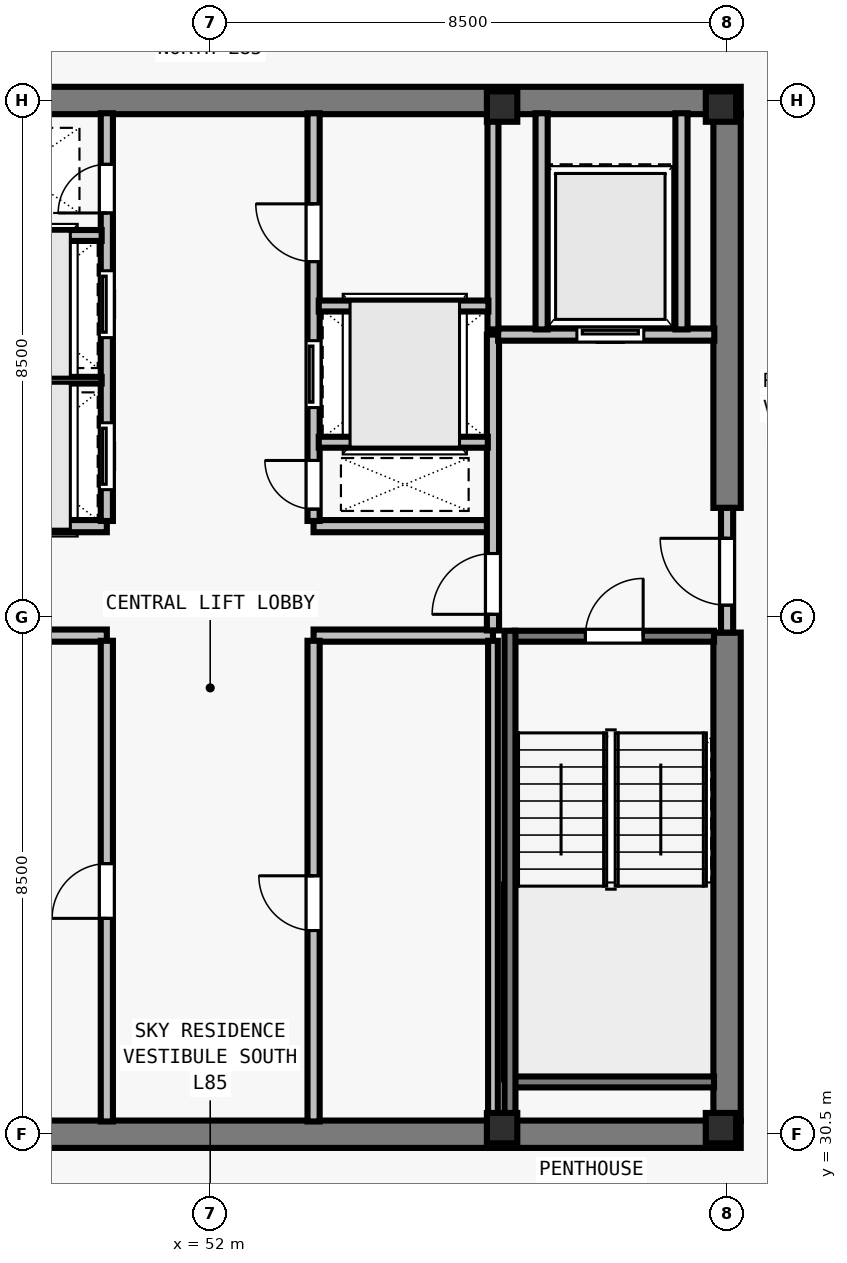
"""IFC4 building model, lengths in metres.
Left out: names, types, materials, properties, quantities, classifications, styles, units other than length and angle.
Written with IfcOpenShell. Run it as: python <this file> out.ifc"""

import sys

from ifc_helpers import new_model, si_unit, direction, frame, frame_2d, origin, origin_2d, place, context, subcontext, project, spatial, rectangle, i_section, extrude, element, fill, save


model = new_model("IFC4")
c1 = context("Model", 3, precision=1e-05, world=origin(), true_north=direction((0.0, 1.0)))
c2 = subcontext(c1, "Body", "Model", "MODEL_VIEW")
j1 = project(units=[si_unit("LENGTHUNIT", "METRE"), si_unit("PLANEANGLEUNIT", "RADIAN")], contexts=[c1])
p1 = place(None, origin())
s1 = spatial("IfcSite", under=j1, at=p1, CompositionType="ELEMENT")
p2 = place(p1, origin())
s2 = spatial("IfcBuilding", under=s1, at=p2, CompositionType="ELEMENT")
p3 = place(p2, frame((0.0, 0.0, 308.5)))
s3 = spatial("IfcBuildingStorey", under=s2, at=p3, CompositionType="ELEMENT", Elevation=308.5)
for number, where, z_axis, x_axis in (
    (1, (56.8, 30.6, 0.0), (0.0, 0.0, 1.0), (1.0, 0.0, 0.0)),
    (2, (60.4, 30.6, 0.0), (0.0, 0.0, 1.0), (1.0, 0.0, 0.0)),
    (3, (56.8, 47.4, 0.0), (0.0, 0.0, 1.0), (1.0, 0.0, 0.0)),
    (4, (60.4, 47.4, 0.0), (0.0, 0.0, 1.0), (1.0, 0.0, 0.0)),
):
    element("IfcColumn", number, at=place(p3, frame(where, z_axis=z_axis, x_axis=x_axis)), inside=s3, PredefinedType="COLUMN", context=c2, shape_type="SweptSolid", body=[
        extrude(i_section(OverallWidth=0.5, OverallDepth=0.5, WebThickness=0.028, FlangeThickness=0.045, at=origin_2d()), origin(), (0.0, 0.0, 1.0), 3.5),
    ])
for number, where, z_axis, x_axis in (
    (5, (43.275, 30.5, 0.0), (0.0, 0.0, 1.0), (1.0, 0.0, 0.0)),
    (6, (43.275, 47.5, 0.0), (0.0, 0.0, 1.0), (1.0, 0.0, 0.0)),
):
    element("IfcWall", number, at=place(p3, frame(where, z_axis=z_axis, x_axis=x_axis)), inside=s3, PredefinedType="SHEAR", context=c2, shape_type="SweptSolid", body=[
        extrude(rectangle(XDim=17.45, YDim=0.45, at=frame_2d((8.725, 0.0))), origin(), (0.0, 0.0, 1.0), 3.29),
    ])
p4 = place(p3, frame((60.5, 30.715, 0.0), z_axis=(0.0, 0.0, 1.0), x_axis=(0.0, 1.0, 0.0)))
e7 = element("IfcWall", 7, at=p4, inside=s3, PredefinedType="SHEAR", context=c2, shape_type="SweptSolid", body=[
    extrude(rectangle(XDim=8.035, YDim=0.45, at=frame_2d((4.018, 0.0))), origin(), (0.0, 0.0, 1.0), 3.29),
])
p5 = place(p3, frame((60.5, 40.8, 0.0), z_axis=(0.0, 0.0, 1.0), x_axis=(0.0, 1.0, 0.0)))
e8 = element("IfcWall", 8, at=p5, inside=s3, PredefinedType="SHEAR", context=c2, shape_type="SweptSolid", body=[
    extrude(rectangle(XDim=6.485, YDim=0.45, at=frame_2d((3.242, 0.0))), origin(), (0.0, 0.0, 1.0), 3.29),
])
for number, where, z_axis, x_axis in (
    (9, (47.35, 38.7, 0.0), (0.0, 0.0, 1.0), (1.0, 0.0, 0.0)),
    (10, (47.35, 40.5, 0.0), (0.0, 0.0, 1.0), (1.0, 0.0, 0.0)),
    (11, (53.7, 38.7, 0.0), (0.0, 0.0, 1.0), (1.0, 0.0, 0.0)),
    (12, (53.7, 40.5, 0.0), (0.0, 0.0, 1.0), (1.0, 0.0, 0.0)),
):
    element("IfcWall", number, at=place(p3, frame(where, z_axis=z_axis, x_axis=x_axis)), inside=s3, PredefinedType="SOLIDWALL", context=c2, shape_type="SweptSolid", body=[
        extrude(rectangle(XDim=2.95, YDim=0.2, at=frame_2d((1.475, 0.0))), origin(), (0.0, 0.0, 1.0), 3.29),
    ])
p6 = place(p3, frame((50.3, 30.71, 0.0), z_axis=(0.0, 0.0, 1.0), x_axis=(0.0, 1.0, 0.0)))
e13 = element("IfcWall", 13, at=p6, inside=s3, PredefinedType="SOLIDWALL", context=c2, shape_type="SweptSolid", body=[
    extrude(rectangle(XDim=7.905, YDim=0.2, at=frame_2d((3.953, 0.0))), origin(), (0.0, 0.0, 1.0), 3.29),
])
p7 = place(p6, frame((3.34, 0.0, 0.0)))
e14 = element("IfcOpeningElement", 14, at=p7, cuts=e13, PredefinedType="OPENING", context=c2, shape_type="SweptSolid", body=[
    extrude(rectangle(XDim=0.9, YDim=2.12, at=frame_2d((0.45, 1.06))), frame((0.0, 0.11, 0.0), z_axis=(0.0, -1.0, 0.0), x_axis=(1.0, 0.0, 0.0)), (0.0, 0.0, 1.0), 0.22),
])
p8 = place(p3, frame((53.7, 30.71, 0.0), z_axis=(0.0, 0.0, 1.0), x_axis=(0.0, 1.0, 0.0)))
e15 = element("IfcWall", 15, at=p8, inside=s3, PredefinedType="SOLIDWALL", context=c2, shape_type="SweptSolid", body=[
    extrude(rectangle(XDim=7.905, YDim=0.2, at=frame_2d((3.953, 0.0))), origin(), (0.0, 0.0, 1.0), 3.29),
])
p9 = place(p8, frame((3.14, 0.0, 0.0)))
e16 = element("IfcOpeningElement", 16, at=p9, cuts=e15, PredefinedType="OPENING", context=c2, shape_type="SweptSolid", body=[
    extrude(rectangle(XDim=0.9, YDim=2.12, at=frame_2d((0.45, 1.06))), frame((0.0, 0.11, 0.0), z_axis=(0.0, -1.0, 0.0), x_axis=(1.0, 0.0, 0.0)), (0.0, 0.0, 1.0), 0.22),
])
p10 = place(p3, frame((50.3, 40.585, 0.0), z_axis=(0.0, 0.0, 1.0), x_axis=(0.0, 1.0, 0.0)))
e17 = element("IfcWall", 17, at=p10, inside=s3, PredefinedType="SOLIDWALL", context=c2, shape_type="SweptSolid", body=[
    extrude(rectangle(XDim=6.705, YDim=0.2, at=frame_2d((3.353, 0.0))), origin(), (0.0, 0.0, 1.0), 3.29),
])
p11 = place(p10, frame((0.515, 0.0, 0.0)))
e18 = element("IfcOpeningElement", 18, at=p11, cuts=e17, PredefinedType="OPENING", context=c2, shape_type="SweptSolid", body=[
    extrude(rectangle(XDim=1.1, YDim=2.2, at=frame_2d((0.55, 1.1))), frame((0.0, 0.11, 0.0), z_axis=(0.0, -1.0, 0.0), x_axis=(1.0, 0.0, 0.0)), (0.0, 0.0, 1.0), 0.22),
])
p12 = place(p10, frame((3.015, 0.0, 0.0)))
e19 = element("IfcOpeningElement", 19, at=p12, cuts=e17, PredefinedType="OPENING", context=c2, shape_type="SweptSolid", body=[
    extrude(rectangle(XDim=1.1, YDim=2.2, at=frame_2d((0.55, 1.1))), frame((0.0, 0.11, 0.0), z_axis=(0.0, -1.0, 0.0), x_axis=(1.0, 0.0, 0.0)), (0.0, 0.0, 1.0), 0.22),
])
p13 = place(p10, frame((5.065, 0.0, 0.0)))
e20 = element("IfcOpeningElement", 20, at=p13, cuts=e17, PredefinedType="OPENING", context=c2, shape_type="SweptSolid", body=[
    extrude(rectangle(XDim=0.8, YDim=2.08, at=frame_2d((0.4, 1.04))), frame((0.0, 0.11, 0.0), z_axis=(0.0, -1.0, 0.0), x_axis=(1.0, 0.0, 0.0)), (0.0, 0.0, 1.0), 0.22),
])
p14 = place(p3, frame((53.7, 40.585, 0.0), z_axis=(0.0, 0.0, 1.0), x_axis=(0.0, 1.0, 0.0)))
e21 = element("IfcWall", 21, at=p14, inside=s3, PredefinedType="SOLIDWALL", context=c2, shape_type="SweptSolid", body=[
    extrude(rectangle(XDim=6.705, YDim=0.2, at=frame_2d((3.353, 0.0))), origin(), (0.0, 0.0, 1.0), 3.29),
])
p15 = place(p14, frame((0.195, 0.0, 0.0)))
e22 = element("IfcOpeningElement", 22, at=p15, cuts=e21, PredefinedType="OPENING", context=c2, shape_type="SweptSolid", body=[
    extrude(rectangle(XDim=0.8, YDim=2.08, at=frame_2d((0.4, 1.04))), frame((0.0, 0.11, 0.0), z_axis=(0.0, -1.0, 0.0), x_axis=(1.0, 0.0, 0.0)), (0.0, 0.0, 1.0), 0.22),
])
p16 = place(p14, frame((1.865, 0.0, 0.0)))
e23 = element("IfcOpeningElement", 23, at=p16, cuts=e21, PredefinedType="OPENING", context=c2, shape_type="SweptSolid", body=[
    extrude(rectangle(XDim=1.1, YDim=2.2, at=frame_2d((0.55, 1.1))), frame((0.0, 0.11, 0.0), z_axis=(0.0, -1.0, 0.0), x_axis=(1.0, 0.0, 0.0)), (0.0, 0.0, 1.0), 0.22),
])
p17 = place(p14, frame((4.265, 0.0, 0.0)))
e24 = element("IfcOpeningElement", 24, at=p17, cuts=e21, PredefinedType="OPENING", context=c2, shape_type="SweptSolid", body=[
    extrude(rectangle(XDim=0.95, YDim=2.12, at=frame_2d((0.475, 1.06))), frame((0.0, 0.11, 0.0), z_axis=(0.0, -1.0, 0.0), x_axis=(1.0, 0.0, 0.0)), (0.0, 0.0, 1.0), 0.22),
])
p18 = place(p3, frame((60.5, 38.75, 0.0), z_axis=(0.0, 0.0, 1.0), x_axis=(0.0, 1.0, 0.0)))
e25 = element("IfcWall", 25, at=p18, inside=s3, PredefinedType="SOLIDWALL", context=c2, shape_type="SweptSolid", body=[
    extrude(rectangle(XDim=2.05, YDim=0.2, at=frame_2d((1.025, 0.0))), origin(), (0.0, 0.0, 1.0), 3.29),
])
p19 = place(p18, frame((0.45, 0.0, 0.0)))
e26 = element("IfcOpeningElement", 26, at=p19, cuts=e25, PredefinedType="OPENING", context=c2, shape_type="SweptSolid", body=[
    extrude(rectangle(XDim=1.1, YDim=2.15, at=frame_2d((0.55, 1.075))), frame((0.0, 0.11, 0.0), z_axis=(0.0, -1.0, 0.0), x_axis=(1.0, 0.0, 0.0)), (0.0, 0.0, 1.0), 0.22),
])
p20 = place(p3, frame((56.65, 38.785, 0.0), z_axis=(0.0, 0.0, 1.0), x_axis=(0.0, 1.0, 0.0)))
e27 = element("IfcWall", 27, at=p20, inside=s3, PredefinedType="SOLIDWALL", context=c2, shape_type="SweptSolid", body=[
    extrude(rectangle(XDim=4.865, YDim=0.2, at=frame_2d((2.433, 0.0))), origin(), (0.0, 0.0, 1.0), 3.29),
])
p21 = place(p20, frame((0.265, 0.0, 0.0)))
e28 = element("IfcOpeningElement", 28, at=p21, cuts=e27, PredefinedType="OPENING", context=c2, shape_type="SweptSolid", body=[
    extrude(rectangle(XDim=1.0, YDim=2.15, at=frame_2d((0.5, 1.075))), frame((0.0, 0.11, 0.0), z_axis=(0.0, -1.0, 0.0), x_axis=(1.0, 0.0, 0.0)), (0.0, 0.0, 1.0), 0.22),
])
p22 = place(p3, frame((56.735, 43.65, 0.0), z_axis=(0.0, 0.0, 1.0), x_axis=(1.0, 0.0, 0.0)))
e29 = element("IfcWall", 29, at=p22, inside=s3, PredefinedType="SOLIDWALL", context=c2, shape_type="SweptSolid", body=[
    extrude(rectangle(XDim=3.555, YDim=0.2, at=frame_2d((1.777, 0.0))), origin(), (0.0, 0.0, 1.0), 3.29),
])
p23 = place(p22, frame((1.295, 0.0, 0.0)))
e30 = element("IfcOpeningElement", 30, at=p23, cuts=e29, PredefinedType="OPENING", context=c2, shape_type="SweptSolid", body=[
    extrude(rectangle(XDim=1.1, YDim=2.2, at=frame_2d((0.55, 1.1))), frame((0.0, 0.11, 0.0), z_axis=(0.0, -1.0, 0.0), x_axis=(1.0, 0.0, 0.0)), (0.0, 0.0, 1.0), 0.22),
])
for number, where, z_axis, x_axis in (
    (31, (57.45, 43.735, 0.0), (0.0, 0.0, 1.0), (0.0, 1.0, 0.0)),
    (32, (59.75, 43.735, 0.0), (0.0, 0.0, 1.0), (0.0, 1.0, 0.0)),
):
    element("IfcWall", number, at=place(p3, frame(where, z_axis=z_axis, x_axis=x_axis)), inside=s3, PredefinedType="SOLIDWALL", context=c2, shape_type="SweptSolid", body=[
        extrude(rectangle(XDim=3.555, YDim=0.2, at=frame_2d((1.777, 0.0))), origin(), (0.0, 0.0, 1.0), 3.29),
    ])
p24 = place(p3, frame((56.65, 30.71, 0.0), z_axis=(0.0, 0.0, 1.0), x_axis=(0.0, 1.0, 0.0)))
e33 = element("IfcWall", 33, at=p24, inside=s3, PredefinedType="PARTITIONING", context=c2, shape_type="SweptSolid", body=[
    extrude(rectangle(XDim=7.905, YDim=0.16, at=frame_2d((3.953, 0.0))), origin(), (0.0, 0.0, 1.0), 3.29),
])
p25 = place(p3, frame((47.435, 42.9, 0.0), z_axis=(0.0, 0.0, 1.0), x_axis=(1.0, 0.0, 0.0)))
e34 = element("IfcWall", 34, at=p25, inside=s3, PredefinedType="PARTITIONING", context=c2, shape_type="SweptSolid", body=[
    extrude(rectangle(XDim=2.78, YDim=0.11, at=frame_2d((1.39, 0.0))), origin(), (0.0, 0.0, 1.0), 3.29),
])
p26 = place(p3, frame((47.425, 45.28, 0.0), z_axis=(0.0, 0.0, 1.0), x_axis=(1.0, 0.0, 0.0)))
e35 = element("IfcWall", 35, at=p26, inside=s3, PredefinedType="SOLIDWALL", context=c2, shape_type="SweptSolid", body=[
    extrude(rectangle(XDim=2.79, YDim=0.18, at=frame_2d((1.395, 0.0))), origin(), (0.0, 0.0, 1.0), 3.29),
])
p27 = place(p3, frame((56.65, 43.735, 0.0), z_axis=(0.0, 0.0, 1.0), x_axis=(0.0, 1.0, 0.0)))
e36 = element("IfcWall", 36, at=p27, inside=s3, PredefinedType="SOLIDWALL", context=c2, shape_type="SweptSolid", body=[
    extrude(rectangle(XDim=3.555, YDim=0.18, at=frame_2d((1.777, 0.0))), origin(), (0.0, 0.0, 1.0), 3.29),
])
p28 = place(p3, frame((53.785, 41.88, 0.0), z_axis=(0.0, 0.0, 1.0), x_axis=(1.0, 0.0, 0.0)))
e37 = element("IfcWall", 37, at=p28, inside=s3, PredefinedType="SOLIDWALL", context=c2, shape_type="SweptSolid", body=[
    extrude(rectangle(XDim=2.78, YDim=0.18, at=frame_2d((1.39, 0.0))), origin(), (0.0, 0.0, 1.0), 3.29),
])
p29 = place(p3, frame((53.785, 44.12, 0.0), z_axis=(0.0, 0.0, 1.0), x_axis=(1.0, 0.0, 0.0)))
e38 = element("IfcWall", 38, at=p29, inside=s3, PredefinedType="SOLIDWALL", context=c2, shape_type="SweptSolid", body=[
    extrude(rectangle(XDim=2.79, YDim=0.18, at=frame_2d((1.395, 0.0))), origin(), (0.0, 0.0, 1.0), 3.29),
])
p30 = place(p3, frame((57.005, 38.69, 0.0), z_axis=(0.0, 0.0, 1.0), x_axis=(1.0, 0.0, 0.0)))
e39 = element("IfcWall", 39, at=p30, inside=s3, PredefinedType="SOLIDWALL", context=c2, shape_type="SweptSolid", body=[
    extrude(rectangle(XDim=3.28, YDim=0.18, at=frame_2d((1.64, 0.0))), origin(), (0.0, 0.0, 1.0), 3.29),
])
p31 = place(p30, frame((1.165, 0.0, 0.0)))
e40 = element("IfcOpeningElement", 40, at=p31, cuts=e39, PredefinedType="OPENING", context=c2, shape_type="SweptSolid", body=[
    extrude(rectangle(XDim=0.95, YDim=2.15, at=frame_2d((0.475, 1.075))), frame((0.0, 0.1, 0.0), z_axis=(0.0, -1.0, 0.0), x_axis=(1.0, 0.0, 0.0)), (0.0, 0.0, 1.0), 0.2),
])
p32 = place(p3, frame((57.005, 31.36, 0.0), z_axis=(0.0, 0.0, 1.0), x_axis=(1.0, 0.0, 0.0)))
e41 = element("IfcWall", 41, at=p32, inside=s3, PredefinedType="SOLIDWALL", context=c2, shape_type="SweptSolid", body=[
    extrude(rectangle(XDim=3.28, YDim=0.18, at=frame_2d((1.64, 0.0))), origin(), (0.0, 0.0, 1.0), 3.29),
])
p33 = place(p3, frame((56.93, 38.78, 0.0), z_axis=(0.0, 0.0, 1.0), x_axis=(0.0, -1.0, 0.0)))
e42 = element("IfcWall", 42, at=p33, inside=s3, PredefinedType="SOLIDWALL", context=c2, shape_type="SweptSolid", body=[
    extrude(rectangle(XDim=8.067, YDim=0.18, at=frame_2d((4.034, 0.0))), origin(), (0.0, 0.0, 1.0), 3.29),
])
p34 = place(p19, origin())
e43 = element("IfcDoor", 43, at=p34, inside=s3, OperationType="SINGLE_SWING_RIGHT", PredefinedType="DOOR", context=c2, shape_type="SweptSolid", body=[
    extrude(rectangle(XDim=1.1, YDim=2.15, at=frame_2d((0.55, 1.075))), frame((0.0, 0.025, 0.0), z_axis=(0.0, -1.0, 0.0), x_axis=(1.0, 0.0, 0.0)), (0.0, 0.0, 1.0), 0.05),
])
fill(e26, e43)
p35 = place(p21, origin())
e44 = element("IfcDoor", 44, at=p35, inside=s3, OperationType="SINGLE_SWING_LEFT", PredefinedType="DOOR", context=c2, shape_type="SweptSolid", body=[
    extrude(rectangle(XDim=1.0, YDim=2.15, at=frame_2d((0.5, 1.075))), frame((0.0, 0.025, 0.0), z_axis=(0.0, -1.0, 0.0), x_axis=(1.0, 0.0, 0.0)), (0.0, 0.0, 1.0), 0.05),
])
fill(e28, e44)
p36 = place(p23, origin())
e45 = element("IfcDoor", 45, at=p36, inside=s3, OperationType="SLIDING_TO_LEFT", PredefinedType="DOOR", context=c2, shape_type="SweptSolid", body=[
    extrude(rectangle(XDim=1.1, YDim=2.2, at=frame_2d((0.55, 1.1))), frame((0.0, 0.025, 0.0), z_axis=(0.0, -1.0, 0.0), x_axis=(1.0, 0.0, 0.0)), (0.0, 0.0, 1.0), 0.05),
])
fill(e30, e45)
p37 = place(p7, origin())
e46 = element("IfcDoor", 46, at=p37, inside=s3, OperationType="SINGLE_SWING_LEFT", PredefinedType="DOOR", context=c2, shape_type="SweptSolid", body=[
    extrude(rectangle(XDim=0.9, YDim=2.12, at=frame_2d((0.45, 1.06))), frame((0.0, 0.025, 0.0), z_axis=(0.0, -1.0, 0.0), x_axis=(1.0, 0.0, 0.0)), (0.0, 0.0, 1.0), 0.05),
])
fill(e14, e46)
p38 = place(p9, origin())
e47 = element("IfcDoor", 47, at=p38, inside=s3, OperationType="SINGLE_SWING_RIGHT", PredefinedType="DOOR", context=c2, shape_type="SweptSolid", body=[
    extrude(rectangle(XDim=0.9, YDim=2.12, at=frame_2d((0.45, 1.06))), frame((0.0, 0.025, 0.0), z_axis=(0.0, -1.0, 0.0), x_axis=(1.0, 0.0, 0.0)), (0.0, 0.0, 1.0), 0.05),
])
fill(e16, e47)
p39 = place(p11, origin())
e48 = element("IfcDoor", 48, at=p39, inside=s3, OperationType="SLIDING_TO_LEFT", PredefinedType="DOOR", context=c2, shape_type="SweptSolid", body=[
    extrude(rectangle(XDim=1.1, YDim=2.2, at=frame_2d((0.55, 1.1))), frame((0.0, 0.025, 0.0), z_axis=(0.0, -1.0, 0.0), x_axis=(1.0, 0.0, 0.0)), (0.0, 0.0, 1.0), 0.05),
])
fill(e18, e48)
p40 = place(p12, origin())
e49 = element("IfcDoor", 49, at=p40, inside=s3, OperationType="SLIDING_TO_LEFT", PredefinedType="DOOR", context=c2, shape_type="SweptSolid", body=[
    extrude(rectangle(XDim=1.1, YDim=2.2, at=frame_2d((0.55, 1.1))), frame((0.0, 0.025, 0.0), z_axis=(0.0, -1.0, 0.0), x_axis=(1.0, 0.0, 0.0)), (0.0, 0.0, 1.0), 0.05),
])
fill(e19, e49)
p41 = place(p13, origin())
e50 = element("IfcDoor", 50, at=p41, inside=s3, OperationType="SINGLE_SWING_LEFT", PredefinedType="DOOR", context=c2, shape_type="SweptSolid", body=[
    extrude(rectangle(XDim=0.8, YDim=2.08, at=frame_2d((0.4, 1.04))), frame((0.0, 0.025, 0.0), z_axis=(0.0, -1.0, 0.0), x_axis=(1.0, 0.0, 0.0)), (0.0, 0.0, 1.0), 0.05),
])
fill(e20, e50)
p42 = place(p15, origin())
e51 = element("IfcDoor", 51, at=p42, inside=s3, OperationType="SINGLE_SWING_RIGHT", PredefinedType="DOOR", context=c2, shape_type="SweptSolid", body=[
    extrude(rectangle(XDim=0.8, YDim=2.08, at=frame_2d((0.4, 1.04))), frame((0.0, 0.025, 0.0), z_axis=(0.0, -1.0, 0.0), x_axis=(1.0, 0.0, 0.0)), (0.0, 0.0, 1.0), 0.05),
])
fill(e22, e51)
p43 = place(p16, origin())
e52 = element("IfcDoor", 52, at=p43, inside=s3, OperationType="SLIDING_TO_LEFT", PredefinedType="DOOR", context=c2, shape_type="SweptSolid", body=[
    extrude(rectangle(XDim=1.1, YDim=2.2, at=frame_2d((0.55, 1.1))), frame((0.0, 0.025, 0.0), z_axis=(0.0, -1.0, 0.0), x_axis=(1.0, 0.0, 0.0)), (0.0, 0.0, 1.0), 0.05),
])
fill(e23, e52)
p44 = place(p17, origin())
e53 = element("IfcDoor", 53, at=p44, inside=s3, OperationType="SINGLE_SWING_RIGHT", PredefinedType="DOOR", context=c2, shape_type="SweptSolid", body=[
    extrude(rectangle(XDim=0.95, YDim=2.12, at=frame_2d((0.475, 1.06))), frame((0.0, 0.025, 0.0), z_axis=(0.0, -1.0, 0.0), x_axis=(1.0, 0.0, 0.0)), (0.0, 0.0, 1.0), 0.05),
])
fill(e24, e53)
p45 = place(p31, origin())
e54 = element("IfcDoor", 54, at=p45, inside=s3, OperationType="SINGLE_SWING_RIGHT", PredefinedType="DOOR", context=c2, shape_type="SweptSolid", body=[
    extrude(rectangle(XDim=0.95, YDim=2.15, at=frame_2d((0.475, 1.075))), frame((0.0, 0.025, 0.0), z_axis=(0.0, -1.0, 0.0), x_axis=(1.0, 0.0, 0.0)), (0.0, 0.0, 1.0), 0.05),
])
fill(e40, e54)
save(model, sys.argv[1])
